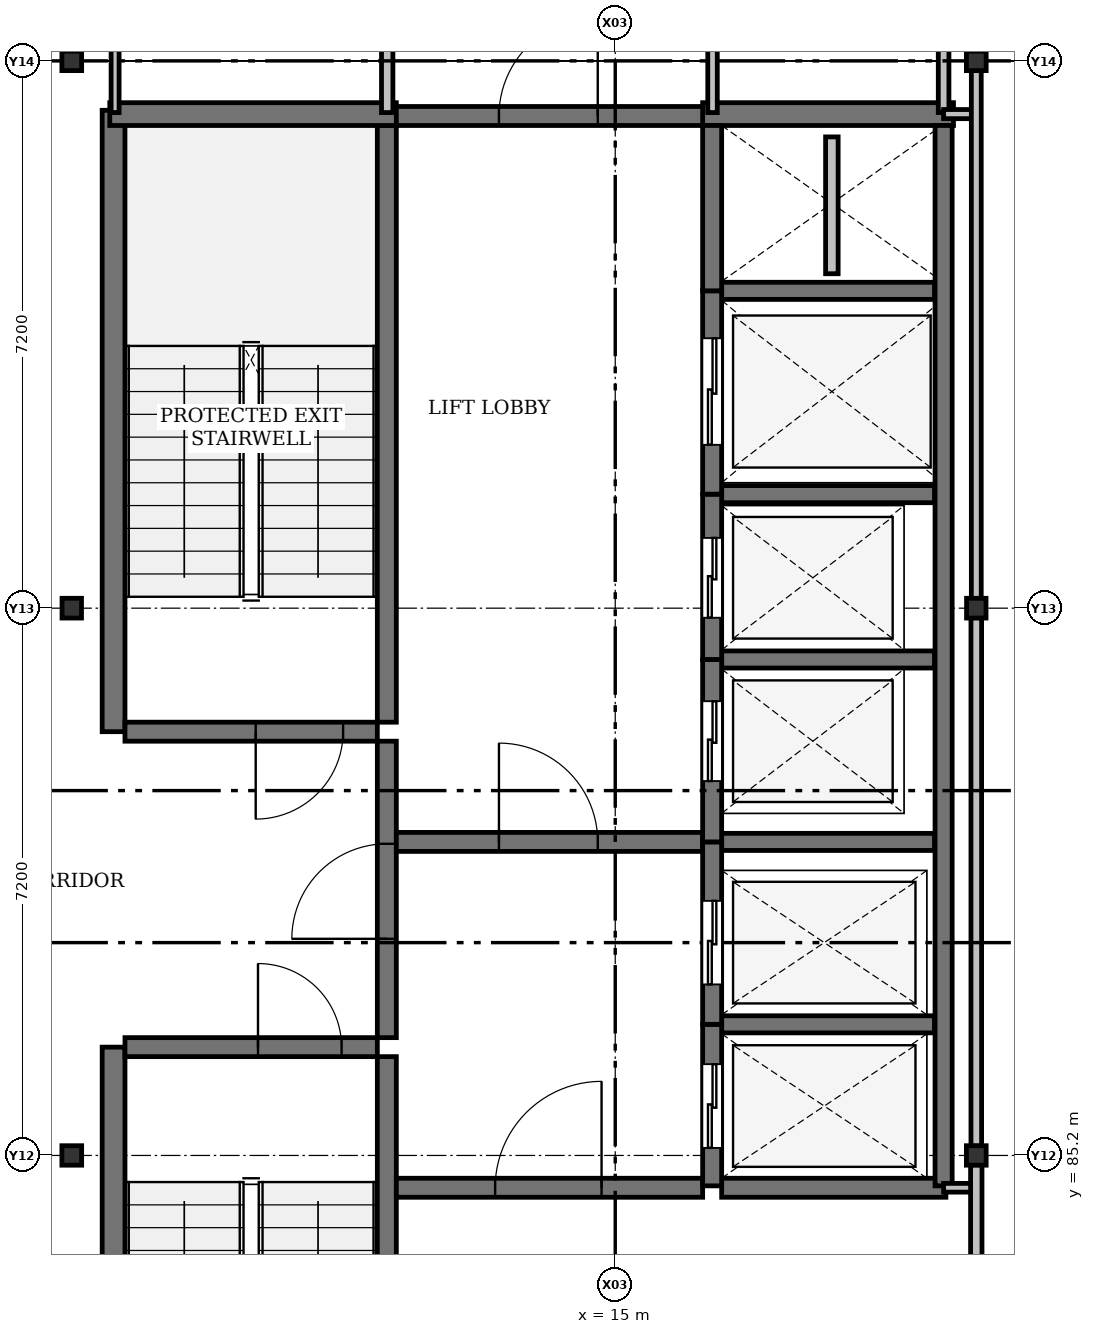
"""IFC4 building model, lengths in metres.
Left out: names, types, materials, properties, quantities, classifications, styles, units other than length and angle.
Written with IfcOpenShell. Run it as: python <this file> out.ifc"""

import sys

from ifc_helpers import new_model, si_unit, direction, frame, frame_2d, origin, origin_2d, place, context, subcontext, project, spatial, rectangle, i_section, extrude, element, fill, save


model = new_model("IFC4")
c1 = context("Model", 3, precision=1e-05, world=origin(), true_north=direction((0.0, 1.0)))
c2 = subcontext(c1, "Body", "Model", "MODEL_VIEW")
j1 = project(units=[si_unit("LENGTHUNIT", "METRE"), si_unit("PLANEANGLEUNIT", "RADIAN")], contexts=[c1])
p1 = place(None, origin())
s1 = spatial("IfcSite", under=j1, at=p1, CompositionType="ELEMENT")
p2 = place(p1, origin())
s2 = spatial("IfcBuilding", under=s1, at=p2, CompositionType="ELEMENT")
p3 = place(p2, frame((0.0, 0.0, 60.3)))
s3 = spatial("IfcBuildingStorey", under=s2, at=p3, CompositionType="ELEMENT", Elevation=60.3)
for number, where, z_axis, x_axis in (
    (1, (7.85, 85.2, 0.0), (0.0, 0.0, 1.0), (0.0, 1.0, 0.0)),
    (2, (19.75, 85.2, 0.0), (0.0, 0.0, 1.0), (0.0, 1.0, 0.0)),
    (3, (7.85, 92.4, 0.0), (0.0, 0.0, 1.0), (1.0, 0.0, 0.0)),
    (4, (19.75, 92.4, 0.0), (0.0, 0.0, 1.0), (1.0, 0.0, 0.0)),
    (5, (7.85, 99.6, 0.0), (0.0, 0.0, 1.0), (0.0, 1.0, 0.0)),
    (6, (19.75, 99.6, 0.0), (0.0, 0.0, 1.0), (0.0, 1.0, 0.0)),
):
    element("IfcColumn", number, at=place(p3, frame(where, z_axis=z_axis, x_axis=x_axis)), inside=s3, PredefinedType="COLUMN", context=c2, shape_type="SweptSolid", body=[
        extrude(i_section(OverallWidth=0.256, OverallDepth=0.26, WebThickness=0.011, FlangeThickness=0.017, FilletRadius=0.013, at=origin_2d()), origin(), (0.0, 0.0, 1.0), 4.2),
    ])
for number, where, z_axis, x_axis in (
    (7, (8.4, 78.45, 0.0), (0.0, 0.0, 1.0), (0.0, 1.0, 0.0)),
    (8, (8.4, 90.775, 0.0), (0.0, 0.0, 1.0), (0.0, 1.0, 0.0)),
):
    element("IfcWall", number, at=place(p3, frame(where, z_axis=z_axis, x_axis=x_axis)), inside=s3, PredefinedType="SHEAR", context=c2, shape_type="SweptSolid", body=[
        extrude(rectangle(XDim=8.175, YDim=0.3, at=frame_2d((4.087, 0.0))), origin(), (0.0, 0.0, 1.0), 4.2),
    ])
for number, where, z_axis, x_axis in (
    (9, (11.995, 78.65, 0.0), (0.0, 0.0, 1.0), (0.0, 1.0, 0.0)),
    (10, (11.995, 90.9, 0.0), (0.0, 0.0, 1.0), (0.0, 1.0, 0.0)),
):
    element("IfcWall", number, at=place(p3, frame(where, z_axis=z_axis, x_axis=x_axis)), inside=s3, PredefinedType="SHEAR", context=c2, shape_type="SweptSolid", body=[
        extrude(rectangle(XDim=7.85, YDim=0.25, at=frame_2d((3.925, 0.0))), origin(), (0.0, 0.0, 1.0), 4.2),
    ])
p4 = place(p3, frame((11.995, 86.75, 0.0), z_axis=(0.0, 0.0, 1.0), x_axis=(0.0, 1.0, 0.0)))
e11 = element("IfcWall", 11, at=p4, inside=s3, PredefinedType="SHEAR", context=c2, shape_type="SweptSolid", body=[
    extrude(rectangle(XDim=3.9, YDim=0.25, at=frame_2d((1.95, 0.0))), origin(), (0.0, 0.0, 1.0), 4.2),
])
p5 = place(p4, frame((1.3, 0.0, 0.0)))
e12 = element("IfcOpeningElement", 12, at=p5, cuts=e11, PredefinedType="OPENING", context=c2, shape_type="SweptSolid", body=[
    extrude(rectangle(XDim=1.25, YDim=2.2, at=frame_2d((0.625, 1.1))), frame((0.0, 0.125, 0.0), z_axis=(0.0, -1.0, 0.0), x_axis=(1.0, 0.0, 0.0)), (0.0, 0.0, 1.0), 0.25),
])
p6 = place(p3, frame((8.35, 98.9, 0.0), z_axis=(0.0, 0.0, 1.0), x_axis=(1.0, 0.0, 0.0)))
e13 = element("IfcWall", 13, at=p6, inside=s3, PredefinedType="SHEAR", context=c2, shape_type="SweptSolid", body=[
    extrude(rectangle(XDim=3.77, YDim=0.3, at=frame_2d((1.885, 0.0))), origin(), (0.0, 0.0, 1.0), 4.2),
])
p7 = place(p3, frame((16.15, 98.9, 0.0), z_axis=(0.0, 0.0, 1.0), x_axis=(1.0, 0.0, 0.0)))
e14 = element("IfcWall", 14, at=p7, inside=s3, PredefinedType="SHEAR", context=c2, shape_type="SweptSolid", body=[
    extrude(rectangle(XDim=3.3, YDim=0.3, at=frame_2d((1.65, 0.0))), origin(), (0.0, 0.0, 1.0), 4.2),
])
p8 = place(p3, frame((12.12, 98.875, 0.0), z_axis=(0.0, 0.0, 1.0), x_axis=(1.0, 0.0, 0.0)))
e15 = element("IfcWall", 15, at=p8, inside=s3, PredefinedType="SHEAR", context=c2, shape_type="SweptSolid", body=[
    extrude(rectangle(XDim=4.03, YDim=0.25, at=frame_2d((2.015, 0.0))), origin(), (0.0, 0.0, 1.0), 4.2),
])
p9 = place(p8, frame((1.35, 0.0, 0.0)))
e16 = element("IfcOpeningElement", 16, at=p9, cuts=e15, PredefinedType="OPENING", context=c2, shape_type="SweptSolid", body=[
    extrude(rectangle(XDim=1.3, YDim=2.2, at=frame_2d((0.65, 1.1))), frame((0.0, 0.125, 0.0), z_axis=(0.0, -1.0, 0.0), x_axis=(1.0, 0.0, 0.0)), (0.0, 0.0, 1.0), 0.25),
])
p10 = place(p3, frame((8.55, 86.625, 0.0), z_axis=(0.0, 0.0, 1.0), x_axis=(1.0, 0.0, 0.0)))
e17 = element("IfcWall", 17, at=p10, inside=s3, PredefinedType="SHEAR", context=c2, shape_type="SweptSolid", body=[
    extrude(rectangle(XDim=3.32, YDim=0.25, at=frame_2d((1.66, 0.0))), origin(), (0.0, 0.0, 1.0), 4.2),
])
p11 = place(p10, frame((1.75, 0.0, 0.0)))
e18 = element("IfcOpeningElement", 18, at=p11, cuts=e17, PredefinedType="OPENING", context=c2, shape_type="SweptSolid", body=[
    extrude(rectangle(XDim=1.1, YDim=2.15, at=frame_2d((0.55, 1.075))), frame((0.0, 0.125, 0.0), z_axis=(0.0, -1.0, 0.0), x_axis=(1.0, 0.0, 0.0)), (0.0, 0.0, 1.0), 0.25),
])
p12 = place(p3, frame((11.87, 90.775, 0.0), z_axis=(0.0, 0.0, 1.0), x_axis=(-1.0, 0.0, 0.0)))
e19 = element("IfcWall", 19, at=p12, inside=s3, PredefinedType="SHEAR", context=c2, shape_type="SweptSolid", body=[
    extrude(rectangle(XDim=3.32, YDim=0.25, at=frame_2d((1.66, 0.0))), origin(), (0.0, 0.0, 1.0), 4.2),
])
p13 = place(p12, frame((0.45, 0.0, 0.0)))
e20 = element("IfcOpeningElement", 20, at=p13, cuts=e19, PredefinedType="OPENING", context=c2, shape_type="SweptSolid", body=[
    extrude(rectangle(XDim=1.15, YDim=2.15, at=frame_2d((0.575, 1.075))), frame((0.0, 0.125, 0.0), z_axis=(0.0, -1.0, 0.0), x_axis=(1.0, 0.0, 0.0)), (0.0, 0.0, 1.0), 0.25),
])
p14 = place(p3, frame((12.12, 89.325, 0.0), z_axis=(0.0, 0.0, 1.0), x_axis=(1.0, 0.0, 0.0)))
e21 = element("IfcWall", 21, at=p14, inside=s3, PredefinedType="SHEAR", context=c2, shape_type="SweptSolid", body=[
    extrude(rectangle(XDim=4.03, YDim=0.25, at=frame_2d((2.015, 0.0))), origin(), (0.0, 0.0, 1.0), 4.2),
])
p15 = place(p14, frame((1.35, 0.0, 0.0)))
e22 = element("IfcOpeningElement", 22, at=p15, cuts=e21, PredefinedType="OPENING", context=c2, shape_type="SweptSolid", body=[
    extrude(rectangle(XDim=1.3, YDim=2.2, at=frame_2d((0.65, 1.1))), frame((0.0, 0.125, 0.0), z_axis=(0.0, -1.0, 0.0), x_axis=(1.0, 0.0, 0.0)), (0.0, 0.0, 1.0), 0.25),
])
p16 = place(p3, frame((12.12, 84.775, 0.0), z_axis=(0.0, 0.0, 1.0), x_axis=(1.0, 0.0, 0.0)))
e23 = element("IfcWall", 23, at=p16, inside=s3, PredefinedType="SHEAR", context=c2, shape_type="SweptSolid", body=[
    extrude(rectangle(XDim=4.03, YDim=0.25, at=frame_2d((2.015, 0.0))), origin(), (0.0, 0.0, 1.0), 4.2),
])
p17 = place(p16, frame((1.3, 0.0, 0.0)))
e24 = element("IfcOpeningElement", 24, at=p17, cuts=e23, PredefinedType="OPENING", context=c2, shape_type="SweptSolid", body=[
    extrude(rectangle(XDim=1.4, YDim=2.25, at=frame_2d((0.7, 1.125))), frame((0.0, 0.125, 0.0), z_axis=(0.0, -1.0, 0.0), x_axis=(1.0, 0.0, 0.0)), (0.0, 0.0, 1.0), 0.25),
])
p18 = place(p3, frame((16.4, 84.775, 0.0), z_axis=(0.0, 0.0, 1.0), x_axis=(1.0, 0.0, 0.0)))
e25 = element("IfcWall", 25, at=p18, inside=s3, PredefinedType="SHEAR", context=c2, shape_type="SweptSolid", body=[
    extrude(rectangle(XDim=2.95, YDim=0.25, at=frame_2d((1.475, 0.0))), origin(), (0.0, 0.0, 1.0), 4.2),
])
p19 = place(p3, frame((19.32, 84.8, 0.0), z_axis=(0.0, 0.0, 1.0), x_axis=(0.0, 1.0, 0.0)))
e26 = element("IfcWall", 26, at=p19, inside=s3, PredefinedType="SHEAR", context=c2, shape_type="SweptSolid", body=[
    extrude(rectangle(XDim=13.95, YDim=0.225, at=frame_2d((6.975, 0.0))), origin(), (0.0, 0.0, 1.0), 4.2),
])
for number, where, z_axis, x_axis in (
    (27, (16.4, 86.925, 0.0), (0.0, 0.0, 1.0), (1.0, 0.0, 0.0)),
    (28, (16.4, 89.325, 0.0), (0.0, 0.0, 1.0), (1.0, 0.0, 0.0)),
    (29, (16.4, 91.725, 0.0), (0.0, 0.0, 1.0), (1.0, 0.0, 0.0)),
    (30, (16.4, 93.9, 0.0), (0.0, 0.0, 1.0), (1.0, 0.0, 0.0)),
    (31, (16.4, 96.575, 0.0), (0.0, 0.0, 1.0), (1.0, 0.0, 0.0)),
):
    element("IfcWall", number, at=place(p3, frame(where, z_axis=z_axis, x_axis=x_axis)), inside=s3, PredefinedType="SHEAR", context=c2, shape_type="SweptSolid", body=[
        extrude(rectangle(XDim=2.8, YDim=0.225, at=frame_2d((1.4, 0.0))), origin(), (0.0, 0.0, 1.0), 4.2),
    ])
p20 = place(p3, frame((16.275, 84.8, 0.0), z_axis=(0.0, 0.0, 1.0), x_axis=(0.0, 1.0, 0.0)))
e32 = element("IfcWall", 32, at=p20, inside=s3, PredefinedType="SHEAR", context=c2, shape_type="SweptSolid", body=[
    extrude(rectangle(XDim=2.125, YDim=0.25, at=frame_2d((1.062, 0.0))), origin(), (0.0, 0.0, 1.0), 4.2),
])
p21 = place(p20, frame((0.5, 0.0, 0.0)))
e33 = element("IfcOpeningElement", 33, at=p21, cuts=e32, PredefinedType="OPENING", context=c2, shape_type="SweptSolid", body=[
    extrude(rectangle(XDim=1.1, YDim=2.15, at=frame_2d((0.55, 1.075))), frame((0.0, 0.125, 0.0), z_axis=(0.0, -1.0, 0.0), x_axis=(1.0, 0.0, 0.0)), (0.0, 0.0, 1.0), 0.25),
])
p22 = place(p3, frame((16.275, 86.925, 0.0), z_axis=(0.0, 0.0, 1.0), x_axis=(0.0, 1.0, 0.0)))
e34 = element("IfcWall", 34, at=p22, inside=s3, PredefinedType="SHEAR", context=c2, shape_type="SweptSolid", body=[
    extrude(rectangle(XDim=2.4, YDim=0.25, at=frame_2d((1.2, 0.0))), origin(), (0.0, 0.0, 1.0), 4.2),
])
p23 = place(p22, frame((0.525, 0.0, 0.0)))
e35 = element("IfcOpeningElement", 35, at=p23, cuts=e34, PredefinedType="OPENING", context=c2, shape_type="SweptSolid", body=[
    extrude(rectangle(XDim=1.1, YDim=2.15, at=frame_2d((0.55, 1.075))), frame((0.0, 0.125, 0.0), z_axis=(0.0, -1.0, 0.0), x_axis=(1.0, 0.0, 0.0)), (0.0, 0.0, 1.0), 0.25),
])
p24 = place(p3, frame((16.275, 89.325, 0.0), z_axis=(0.0, 0.0, 1.0), x_axis=(0.0, 1.0, 0.0)))
e36 = element("IfcWall", 36, at=p24, inside=s3, PredefinedType="SHEAR", context=c2, shape_type="SweptSolid", body=[
    extrude(rectangle(XDim=2.4, YDim=0.25, at=frame_2d((1.2, 0.0))), origin(), (0.0, 0.0, 1.0), 4.2),
])
p25 = place(p24, frame((0.8, 0.0, 0.0)))
e37 = element("IfcOpeningElement", 37, at=p25, cuts=e36, PredefinedType="OPENING", context=c2, shape_type="SweptSolid", body=[
    extrude(rectangle(XDim=1.05, YDim=2.15, at=frame_2d((0.525, 1.075))), frame((0.0, 0.125, 0.0), z_axis=(0.0, -1.0, 0.0), x_axis=(1.0, 0.0, 0.0)), (0.0, 0.0, 1.0), 0.25),
])
p26 = place(p3, frame((16.275, 91.725, 0.0), z_axis=(0.0, 0.0, 1.0), x_axis=(0.0, 1.0, 0.0)))
e38 = element("IfcWall", 38, at=p26, inside=s3, PredefinedType="SHEAR", context=c2, shape_type="SweptSolid", body=[
    extrude(rectangle(XDim=2.175, YDim=0.25, at=frame_2d((1.087, 0.0))), origin(), (0.0, 0.0, 1.0), 4.2),
])
p27 = place(p26, frame((0.55, 0.0, 0.0)))
e39 = element("IfcOpeningElement", 39, at=p27, cuts=e38, PredefinedType="OPENING", context=c2, shape_type="SweptSolid", body=[
    extrude(rectangle(XDim=1.05, YDim=2.15, at=frame_2d((0.525, 1.075))), frame((0.0, 0.125, 0.0), z_axis=(0.0, -1.0, 0.0), x_axis=(1.0, 0.0, 0.0)), (0.0, 0.0, 1.0), 0.25),
])
p28 = place(p3, frame((16.275, 93.9, 0.0), z_axis=(0.0, 0.0, 1.0), x_axis=(0.0, 1.0, 0.0)))
e40 = element("IfcWall", 40, at=p28, inside=s3, PredefinedType="SHEAR", context=c2, shape_type="SweptSolid", body=[
    extrude(rectangle(XDim=2.675, YDim=0.25, at=frame_2d((1.337, 0.0))), origin(), (0.0, 0.0, 1.0), 4.2),
])
p29 = place(p28, frame((0.65, 0.0, 0.0)))
e41 = element("IfcOpeningElement", 41, at=p29, cuts=e40, PredefinedType="OPENING", context=c2, shape_type="SweptSolid", body=[
    extrude(rectangle(XDim=1.4, YDim=2.25, at=frame_2d((0.7, 1.125))), frame((0.0, 0.125, 0.0), z_axis=(0.0, -1.0, 0.0), x_axis=(1.0, 0.0, 0.0)), (0.0, 0.0, 1.0), 0.25),
])
p30 = place(p3, frame((16.275, 96.575, 0.0), z_axis=(0.0, 0.0, 1.0), x_axis=(0.0, 1.0, 0.0)))
e42 = element("IfcWall", 42, at=p30, inside=s3, PredefinedType="SHEAR", context=c2, shape_type="SweptSolid", body=[
    extrude(rectangle(XDim=2.175, YDim=0.25, at=frame_2d((1.087, 0.0))), origin(), (0.0, 0.0, 1.0), 4.2),
])
p31 = place(p3, frame((17.85, 96.8, 0.0), z_axis=(0.0, 0.0, 1.0), x_axis=(0.0, 1.0, 0.0)))
e43 = element("IfcWall", 43, at=p31, inside=s3, PredefinedType="PLUMBINGWALL", context=c2, shape_type="SweptSolid", body=[
    extrude(rectangle(XDim=1.8, YDim=0.165, at=frame_2d((0.9, 0.0))), origin(), (0.0, 0.0, 1.0), 4.2),
])
p32 = place(p3, frame((8.42, 98.92, 0.0), z_axis=(0.0, 0.0, 1.0), x_axis=(0.0, 1.0, 0.0)))
e44 = element("IfcWall", 44, at=p32, inside=s3, PredefinedType="PARTITIONING", context=c2, shape_type="SweptSolid", body=[
    extrude(rectangle(XDim=2.74, YDim=0.105, at=frame_2d((1.37, 0.0))), origin(), (0.0, 0.0, 1.0), 3.451),
])
p33 = place(p3, frame((12.0, 101.6, 0.0), z_axis=(0.0, 0.0, 1.0), x_axis=(0.0, -1.0, 0.0)))
e45 = element("IfcWall", 45, at=p33, inside=s3, PredefinedType="PARTITIONING", context=c2, shape_type="SweptSolid", body=[
    extrude(rectangle(XDim=2.68, YDim=0.15, at=frame_2d((1.34, 0.0))), origin(), (0.0, 0.0, 1.0), 3.451),
])
p34 = place(p33, frame((0.88, 0.0, 0.0)))
e46 = element("IfcOpeningElement", 46, at=p34, cuts=e45, PredefinedType="OPENING", context=c2, shape_type="SweptSolid", body=[
    extrude(rectangle(XDim=0.92, YDim=2.1, at=frame_2d((0.46, 1.05))), frame((0.0, 0.075, 0.0), z_axis=(0.0, -1.0, 0.0), x_axis=(1.0, 0.0, 0.0)), (0.0, 0.0, 1.0), 0.15),
])
p35 = place(p3, frame((19.32, 98.92, 0.0), z_axis=(0.0, 0.0, 1.0), x_axis=(0.0, 1.0, 0.0)))
e47 = element("IfcWall", 47, at=p35, inside=s3, PredefinedType="PARTITIONING", context=c2, shape_type="SweptSolid", body=[
    extrude(rectangle(XDim=2.74, YDim=0.14, at=frame_2d((1.37, 0.0))), origin(), (0.0, 0.0, 1.0), 3.451),
])
p36 = place(p3, frame((16.28, 98.92, 0.0), z_axis=(0.0, 0.0, 1.0), x_axis=(0.0, 1.0, 0.0)))
e48 = element("IfcWall", 48, at=p36, inside=s3, PredefinedType="PARTITIONING", context=c2, shape_type="SweptSolid", body=[
    extrude(rectangle(XDim=2.68, YDim=0.125, at=frame_2d((1.34, 0.0))), origin(), (0.0, 0.0, 1.0), 3.451),
])
p37 = place(p36, frame((0.865, 0.0, 0.0)))
e49 = element("IfcOpeningElement", 49, at=p37, cuts=e48, PredefinedType="OPENING", context=c2, shape_type="SweptSolid", body=[
    extrude(rectangle(XDim=0.95, YDim=2.1, at=frame_2d((0.475, 1.05))), frame((0.0, 0.062, 0.0), z_axis=(0.0, -1.0, 0.0), x_axis=(1.0, 0.0, 0.0)), (0.0, 0.0, 1.0), 0.125),
])
p38 = place(p3, frame((19.75, 98.9, 0.0), z_axis=(0.0, 0.0, 1.0), x_axis=(-1.0, 0.0, 0.0)))
e50 = element("IfcWall", 50, at=p38, inside=s3, PredefinedType="PARTITIONING", context=c2, shape_type="SweptSolid", body=[
    extrude(rectangle(XDim=0.43, YDim=0.12, at=frame_2d((0.215, 0.0))), origin(), (0.0, 0.0, 1.0), 3.527),
])
p39 = place(p3, frame((19.32, 84.775, 0.0), z_axis=(0.0, 0.0, 1.0), x_axis=(1.0, 0.0, 0.0)))
e51 = element("IfcWall", 51, at=p39, inside=s3, PredefinedType="PARTITIONING", context=c2, shape_type="SweptSolid", body=[
    extrude(rectangle(XDim=0.43, YDim=0.115, at=frame_2d((0.215, 0.0))), origin(), (0.0, 0.0, 1.0), 3.527),
])
p40 = place(p3, frame((19.75, 78.125, 0.0), z_axis=(0.0, 0.0, 1.0), x_axis=(0.0, 1.0, 0.0)))
e52 = element("IfcWall", 52, at=p40, inside=s3, PredefinedType="PARTITIONING", context=c2, shape_type="SweptSolid", body=[
    extrude(rectangle(XDim=6.952, YDim=0.15, at=frame_2d((3.476, 0.0))), origin(), (0.0, 0.0, 1.0), 3.527),
])
p41 = place(p3, frame((19.75, 85.323, 0.0), z_axis=(0.0, 0.0, 1.0), x_axis=(0.0, 1.0, 0.0)))
e53 = element("IfcWall", 53, at=p41, inside=s3, PredefinedType="PARTITIONING", context=c2, shape_type="SweptSolid", body=[
    extrude(rectangle(XDim=6.952, YDim=0.14, at=frame_2d((3.476, 0.0))), origin(), (0.0, 0.0, 1.0), 3.527),
])
p42 = place(p3, frame((19.75, 92.525, 0.0), z_axis=(0.0, 0.0, 1.0), x_axis=(0.0, 1.0, 0.0)))
e54 = element("IfcWall", 54, at=p42, inside=s3, PredefinedType="PARTITIONING", context=c2, shape_type="SweptSolid", body=[
    extrude(rectangle(XDim=6.952, YDim=0.13, at=frame_2d((3.476, 0.0))), origin(), (0.0, 0.0, 1.0), 3.527),
])
p43 = place(p5, origin())
e55 = element("IfcDoor", 55, at=p43, inside=s3, OperationType="SINGLE_SWING_LEFT", PredefinedType="DOOR", context=c2, shape_type="SweptSolid", body=[
    extrude(rectangle(XDim=1.25, YDim=2.2, at=frame_2d((0.625, 1.1))), frame((0.0, 0.025, 0.0), z_axis=(0.0, -1.0, 0.0), x_axis=(1.0, 0.0, 0.0)), (0.0, 0.0, 1.0), 0.05),
])
fill(e12, e55)
p44 = place(p9, origin())
e56 = element("IfcDoor", 56, at=p44, inside=s3, OperationType="SINGLE_SWING_RIGHT", PredefinedType="DOOR", context=c2, shape_type="SweptSolid", body=[
    extrude(rectangle(XDim=1.3, YDim=2.2, at=frame_2d((0.65, 1.1))), frame((0.0, 0.025, 0.0), z_axis=(0.0, -1.0, 0.0), x_axis=(1.0, 0.0, 0.0)), (0.0, 0.0, 1.0), 0.05),
])
fill(e16, e56)
p45 = place(p11, origin())
e57 = element("IfcDoor", 57, at=p45, inside=s3, OperationType="SINGLE_SWING_LEFT", PredefinedType="DOOR", context=c2, shape_type="SweptSolid", body=[
    extrude(rectangle(XDim=1.1, YDim=2.15, at=frame_2d((0.55, 1.075))), frame((0.0, 0.025, 0.0), z_axis=(0.0, -1.0, 0.0), x_axis=(1.0, 0.0, 0.0)), (0.0, 0.0, 1.0), 0.05),
])
fill(e18, e57)
p46 = place(p13, origin())
e58 = element("IfcDoor", 58, at=p46, inside=s3, OperationType="SINGLE_SWING_RIGHT", PredefinedType="DOOR", context=c2, shape_type="SweptSolid", body=[
    extrude(rectangle(XDim=1.15, YDim=2.15, at=frame_2d((0.575, 1.075))), frame((0.0, 0.025, 0.0), z_axis=(0.0, -1.0, 0.0), x_axis=(1.0, 0.0, 0.0)), (0.0, 0.0, 1.0), 0.05),
])
fill(e20, e58)
p47 = place(p15, origin())
e59 = element("IfcDoor", 59, at=p47, inside=s3, OperationType="SINGLE_SWING_LEFT", PredefinedType="DOOR", context=c2, shape_type="SweptSolid", body=[
    extrude(rectangle(XDim=1.3, YDim=2.2, at=frame_2d((0.65, 1.1))), frame((0.0, 0.025, 0.0), z_axis=(0.0, -1.0, 0.0), x_axis=(1.0, 0.0, 0.0)), (0.0, 0.0, 1.0), 0.05),
])
fill(e22, e59)
p48 = place(p17, origin())
e60 = element("IfcDoor", 60, at=p48, inside=s3, OperationType="SINGLE_SWING_RIGHT", PredefinedType="DOOR", context=c2, shape_type="SweptSolid", body=[
    extrude(rectangle(XDim=1.4, YDim=2.25, at=frame_2d((0.7, 1.125))), frame((0.0, 0.025, 0.0), z_axis=(0.0, -1.0, 0.0), x_axis=(1.0, 0.0, 0.0)), (0.0, 0.0, 1.0), 0.05),
])
fill(e24, e60)
p49 = place(p21, origin())
e61 = element("IfcDoor", 61, at=p49, inside=s3, OperationType="SLIDING_TO_LEFT", PredefinedType="DOOR", context=c2, shape_type="SweptSolid", body=[
    extrude(rectangle(XDim=1.1, YDim=2.15, at=frame_2d((0.55, 1.075))), frame((0.0, 0.025, 0.0), z_axis=(0.0, -1.0, 0.0), x_axis=(1.0, 0.0, 0.0)), (0.0, 0.0, 1.0), 0.05),
])
fill(e33, e61)
p50 = place(p23, origin())
e62 = element("IfcDoor", 62, at=p50, inside=s3, OperationType="SLIDING_TO_LEFT", PredefinedType="DOOR", context=c2, shape_type="SweptSolid", body=[
    extrude(rectangle(XDim=1.1, YDim=2.15, at=frame_2d((0.55, 1.075))), frame((0.0, 0.025, 0.0), z_axis=(0.0, -1.0, 0.0), x_axis=(1.0, 0.0, 0.0)), (0.0, 0.0, 1.0), 0.05),
])
fill(e35, e62)
p51 = place(p25, origin())
e63 = element("IfcDoor", 63, at=p51, inside=s3, OperationType="SLIDING_TO_LEFT", PredefinedType="DOOR", context=c2, shape_type="SweptSolid", body=[
    extrude(rectangle(XDim=1.05, YDim=2.15, at=frame_2d((0.525, 1.075))), frame((0.0, 0.025, 0.0), z_axis=(0.0, -1.0, 0.0), x_axis=(1.0, 0.0, 0.0)), (0.0, 0.0, 1.0), 0.05),
])
fill(e37, e63)
p52 = place(p27, origin())
e64 = element("IfcDoor", 64, at=p52, inside=s3, OperationType="SLIDING_TO_LEFT", PredefinedType="DOOR", context=c2, shape_type="SweptSolid", body=[
    extrude(rectangle(XDim=1.05, YDim=2.15, at=frame_2d((0.525, 1.075))), frame((0.0, 0.025, 0.0), z_axis=(0.0, -1.0, 0.0), x_axis=(1.0, 0.0, 0.0)), (0.0, 0.0, 1.0), 0.05),
])
fill(e39, e64)
p53 = place(p29, origin())
e65 = element("IfcDoor", 65, at=p53, inside=s3, OperationType="SLIDING_TO_LEFT", PredefinedType="DOOR", context=c2, shape_type="SweptSolid", body=[
    extrude(rectangle(XDim=1.4, YDim=2.25, at=frame_2d((0.7, 1.125))), frame((0.0, 0.025, 0.0), z_axis=(0.0, -1.0, 0.0), x_axis=(1.0, 0.0, 0.0)), (0.0, 0.0, 1.0), 0.05),
])
fill(e41, e65)
save(model, sys.argv[1])
